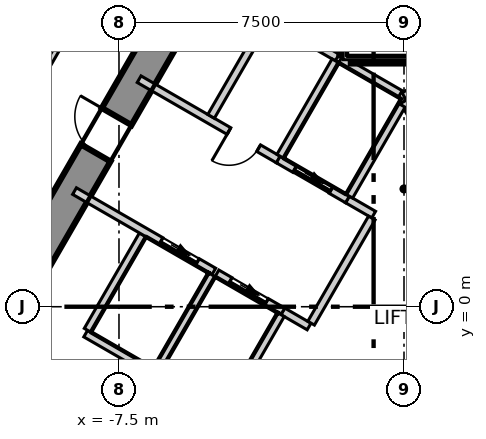
"""IFC4 building model, lengths in metres.
Left out: names, types, materials, properties, quantities, classifications, styles, units other than length and angle.
Written with IfcOpenShell. Run it as: python <this file> out.ifc"""

import sys

from ifc_helpers import new_model, si_unit, direction, frame, frame_2d, origin, place, context, subcontext, project, spatial, polyline, rectangle, outline, extrude, element, fill, save


model = new_model("IFC4")
c1 = context("Model", 3, precision=1e-05, world=origin(), true_north=direction((0.0, 1.0)))
c2 = subcontext(c1, "Body", "Model", "MODEL_VIEW")
j1 = project(units=[si_unit("LENGTHUNIT", "METRE"), si_unit("PLANEANGLEUNIT", "RADIAN")], contexts=[c1])
p1 = place(None, origin())
s1 = spatial("IfcSite", under=j1, at=p1, CompositionType="ELEMENT")
p2 = place(p1, origin())
s2 = spatial("IfcBuilding", under=s1, at=p2, CompositionType="ELEMENT")
p3 = place(p2, frame((0.0, 0.0, 47.3)))
s3 = spatial("IfcBuildingStorey", under=s2, at=p3, CompositionType="ELEMENT", Elevation=47.3)
p4 = place(p3, frame((-1.645, 15.25, -0.3), z_axis=(0.0, 0.0, 1.0), x_axis=(-0.500026485275, -0.866010111964, 0.0)))
e1 = element("IfcWall", 1, at=p4, inside=s3, PredefinedType="SHEAR", context=c2, shape_type="SweptSolid", body=[
    extrude(outline(polyline([(-0.26, -0.45), (1.685, -0.45), (3.63, -0.45), (5.576, -0.45), (7.521, -0.45), (9.466, -0.449), (11.411, -0.449), (13.357, -0.449), (15.302, -0.449), (17.247, -0.449), (19.192, -0.449), (21.138, -0.449), (23.083, -0.449), (25.028, -0.449), (24.509, 0.45), (22.644, 0.45), (20.778, 0.45), (18.913, 0.45), (17.048, 0.45), (15.182, 0.449), (13.317, 0.449), (11.452, 0.449), (9.587, 0.449), (7.721, 0.449), (5.856, 0.449), (3.991, 0.449), (2.125, 0.449), (0.26, 0.449), (-0.26, -0.45)])), origin(), (0.0, 0.0, 1.0), 4.0),
])
p5 = place(p4, frame((11.834, 0.0, 0.3)))
e2 = element("IfcOpeningElement", 2, at=p5, cuts=e1, PredefinedType="OPENING", context=c2, shape_type="SweptSolid", body=[
    extrude(rectangle(XDim=1.1, YDim=2.1, at=frame_2d((0.55, 1.05))), frame((0.0, 0.46, 0.0), z_axis=(0.0, -1.0, 0.0), x_axis=(1.0, 0.0, 0.0)), (0.0, 0.0, 1.0), 0.92),
])
p6 = place(p4, frame((6.671, 0.0, 0.3)))
e3 = element("IfcOpeningElement", 3, at=p6, cuts=e1, PredefinedType="OPENING", context=c2, shape_type="SweptSolid", body=[
    extrude(rectangle(XDim=1.0, YDim=2.1, at=frame_2d((0.5, 1.05))), frame((0.0, 0.46, 0.0), z_axis=(0.0, -1.0, 0.0), x_axis=(1.0, 0.0, 0.0)), (0.0, 0.0, 1.0), 0.92),
])
p7 = place(p3, frame((-3.417, 38.096, 0.0), z_axis=(0.0, 0.0, 1.0), x_axis=(-0.500000412988, -0.866025165346, 0.0)))
e4 = element("IfcWall", 4, at=p7, inside=s3, PredefinedType="ELEMENTEDWALL", context=c2, shape_type="SweptSolid", body=[
    extrude(rectangle(XDim=62.548, YDim=0.2, at=frame_2d((31.274, 0.0))), origin(), (0.0, 0.0, 1.0), 3.7),
])
p8 = place(p7, frame((2.25, 0.0, 0.9)))
e5 = element("IfcOpeningElement", 5, at=p8, cuts=e4, PredefinedType="OPENING", context=c2, shape_type="SweptSolid", body=[
    extrude(rectangle(XDim=5.6, YDim=2.5, at=frame_2d((2.8, 1.25))), frame((0.0, 0.11, 0.0), z_axis=(0.0, -1.0, 0.0), x_axis=(1.0, 0.0, 0.0)), (0.0, 0.0, 1.0), 0.22),
])
p9 = place(p7, frame((9.745, 0.0, 0.9)))
e6 = element("IfcOpeningElement", 6, at=p9, cuts=e4, PredefinedType="OPENING", context=c2, shape_type="SweptSolid", body=[
    extrude(rectangle(XDim=5.6, YDim=2.5, at=frame_2d((2.8, 1.25))), frame((0.0, 0.11, 0.0), z_axis=(0.0, -1.0, 0.0), x_axis=(1.0, 0.0, 0.0)), (0.0, 0.0, 1.0), 0.22),
])
p10 = place(p7, frame((17.241, 0.0, 0.9)))
e7 = element("IfcOpeningElement", 7, at=p10, cuts=e4, PredefinedType="OPENING", context=c2, shape_type="SweptSolid", body=[
    extrude(rectangle(XDim=5.6, YDim=2.5, at=frame_2d((2.8, 1.25))), frame((0.0, 0.11, 0.0), z_axis=(0.0, -1.0, 0.0), x_axis=(1.0, 0.0, 0.0)), (0.0, 0.0, 1.0), 0.22),
])
p11 = place(p7, frame((24.736, 0.0, 0.9)))
e8 = element("IfcOpeningElement", 8, at=p11, cuts=e4, PredefinedType="OPENING", context=c2, shape_type="SweptSolid", body=[
    extrude(rectangle(XDim=5.6, YDim=2.5, at=frame_2d((2.8, 1.25))), frame((0.0, 0.11, 0.0), z_axis=(0.0, -1.0, 0.0), x_axis=(1.0, 0.0, 0.0)), (0.0, 0.0, 1.0), 0.22),
])
p12 = place(p7, frame((32.231, 0.0, 0.9)))
e9 = element("IfcOpeningElement", 9, at=p12, cuts=e4, PredefinedType="OPENING", context=c2, shape_type="SweptSolid", body=[
    extrude(rectangle(XDim=5.6, YDim=2.5, at=frame_2d((2.8, 1.25))), frame((0.0, 0.11, 0.0), z_axis=(0.0, -1.0, 0.0), x_axis=(1.0, 0.0, 0.0)), (0.0, 0.0, 1.0), 0.22),
])
p13 = place(p7, frame((39.727, 0.0, 0.9)))
e10 = element("IfcOpeningElement", 10, at=p13, cuts=e4, PredefinedType="OPENING", context=c2, shape_type="SweptSolid", body=[
    extrude(rectangle(XDim=5.6, YDim=2.5, at=frame_2d((2.8, 1.25))), frame((0.0, 0.11, 0.0), z_axis=(0.0, -1.0, 0.0), x_axis=(1.0, 0.0, 0.0)), (0.0, 0.0, 1.0), 0.22),
])
p14 = place(p7, frame((47.222, 0.0, 0.9)))
e11 = element("IfcOpeningElement", 11, at=p14, cuts=e4, PredefinedType="OPENING", context=c2, shape_type="SweptSolid", body=[
    extrude(rectangle(XDim=5.6, YDim=2.5, at=frame_2d((2.8, 1.25))), frame((0.0, 0.11, 0.0), z_axis=(0.0, -1.0, 0.0), x_axis=(1.0, 0.0, 0.0)), (0.0, 0.0, 1.0), 0.22),
])
p15 = place(p7, frame((54.717, 0.0, 0.9)))
e12 = element("IfcOpeningElement", 12, at=p15, cuts=e4, PredefinedType="OPENING", context=c2, shape_type="SweptSolid", body=[
    extrude(rectangle(XDim=5.6, YDim=2.5, at=frame_2d((2.8, 1.25))), frame((0.0, 0.11, 0.0), z_axis=(0.0, -1.0, 0.0), x_axis=(1.0, 0.0, 0.0)), (0.0, 0.0, 1.0), 0.22),
])
p16 = place(p3, frame((-19.497, -11.17, 0.0), z_axis=(0.0, 0.0, 1.0), x_axis=(0.499998854553, 0.866026065108, 0.0)))
e13 = element("IfcWall", 13, at=p16, inside=s3, PredefinedType="PARTITIONING", context=c2, shape_type="SweptSolid", body=[
    extrude(rectangle(XDim=38.994, YDim=0.15, at=frame_2d((19.497, 0.0))), origin(), (0.0, 0.0, 1.0), 3.7),
])
p17 = place(p16, frame((36.144, 0.0, 0.0)))
e14 = element("IfcOpeningElement", 14, at=p17, cuts=e13, PredefinedType="OPENING", context=c2, shape_type="SweptSolid", body=[
    extrude(rectangle(XDim=1.1, YDim=2.1, at=frame_2d((0.55, 1.05))), frame((0.0, 0.085, 0.0), z_axis=(0.0, -1.0, 0.0), x_axis=(1.0, 0.0, 0.0)), (0.0, 0.0, 1.0), 0.17),
])
p18 = place(p16, frame((21.963, 0.0, 0.0)))
e15 = element("IfcOpeningElement", 15, at=p18, cuts=e13, PredefinedType="OPENING", context=c2, shape_type="SweptSolid", body=[
    extrude(rectangle(XDim=1.1, YDim=2.1, at=frame_2d((0.55, 1.05))), frame((0.0, 0.085, 0.0), z_axis=(0.0, -1.0, 0.0), x_axis=(1.0, 0.0, 0.0)), (0.0, 0.0, 1.0), 0.17),
])
p19 = place(p16, frame((32.363, 0.0, 0.0)))
e16 = element("IfcOpeningElement", 16, at=p19, cuts=e13, PredefinedType="OPENING", context=c2, shape_type="SweptSolid", body=[
    extrude(rectangle(XDim=0.9, YDim=2.1, at=frame_2d((0.45, 1.05))), frame((0.0, 0.085, 0.0), z_axis=(0.0, -1.0, 0.0), x_axis=(1.0, 0.0, 0.0)), (0.0, 0.0, 1.0), 0.17),
])
p20 = place(p16, frame((29.163, 0.0, 0.0)))
e17 = element("IfcOpeningElement", 17, at=p20, cuts=e13, PredefinedType="OPENING", context=c2, shape_type="SweptSolid", body=[
    extrude(rectangle(XDim=0.9, YDim=2.1, at=frame_2d((0.45, 1.05))), frame((0.0, 0.085, 0.0), z_axis=(0.0, -1.0, 0.0), x_axis=(1.0, 0.0, 0.0)), (0.0, 0.0, 1.0), 0.17),
])
p21 = place(p16, frame((26.263, 0.0, 0.0)))
e18 = element("IfcOpeningElement", 18, at=p21, cuts=e13, PredefinedType="OPENING", context=c2, shape_type="SweptSolid", body=[
    extrude(rectangle(XDim=1.0, YDim=2.1, at=frame_2d((0.5, 1.05))), frame((0.0, 0.085, 0.0), z_axis=(0.0, -1.0, 0.0), x_axis=(1.0, 0.0, 0.0)), (0.0, 0.0, 1.0), 0.17),
])
p22 = place(p16, frame((11.373, 0.0, 0.0)))
e19 = element("IfcOpeningElement", 19, at=p22, cuts=e13, PredefinedType="OPENING", context=c2, shape_type="SweptSolid", body=[
    extrude(rectangle(XDim=1.1, YDim=2.1, at=frame_2d((0.55, 1.05))), frame((0.0, 0.085, 0.0), z_axis=(0.0, -1.0, 0.0), x_axis=(1.0, 0.0, 0.0)), (0.0, 0.0, 1.0), 0.17),
])
p23 = place(p16, frame((1.581, 0.0, 0.0)))
e20 = element("IfcOpeningElement", 20, at=p23, cuts=e13, PredefinedType="OPENING", context=c2, shape_type="SweptSolid", body=[
    extrude(rectangle(XDim=1.1, YDim=2.1, at=frame_2d((0.55, 1.05))), frame((0.0, 0.085, 0.0), z_axis=(0.0, -1.0, 0.0), x_axis=(1.0, 0.0, 0.0)), (0.0, 0.0, 1.0), 0.17),
])
p24 = place(p3, frame((0.075, 22.47, 0.0), z_axis=(0.0, 0.0, 1.0), x_axis=(0.500002280369, -0.866024087209, 0.0)))
e21 = element("IfcWall", 21, at=p24, inside=s3, PredefinedType="PARTITIONING", context=c2, shape_type="SweptSolid", body=[
    extrude(rectangle(XDim=38.844, YDim=0.15, at=frame_2d((19.422, 0.0))), origin(), (0.0, 0.0, 1.0), 3.7),
])
p25 = place(p24, frame((36.244, 0.0, 0.0)))
e22 = element("IfcOpeningElement", 22, at=p25, cuts=e21, PredefinedType="OPENING", context=c2, shape_type="SweptSolid", body=[
    extrude(rectangle(XDim=1.0, YDim=2.1, at=frame_2d((0.5, 1.05))), frame((0.0, 0.085, 0.0), z_axis=(0.0, -1.0, 0.0), x_axis=(1.0, 0.0, 0.0)), (0.0, 0.0, 1.0), 0.17),
])
p26 = place(p24, frame((21.963, 0.0, 0.0)))
e23 = element("IfcOpeningElement", 23, at=p26, cuts=e21, PredefinedType="OPENING", context=c2, shape_type="SweptSolid", body=[
    extrude(rectangle(XDim=1.1, YDim=2.1, at=frame_2d((0.55, 1.05))), frame((0.0, 0.085, 0.0), z_axis=(0.0, -1.0, 0.0), x_axis=(1.0, 0.0, 0.0)), (0.0, 0.0, 1.0), 0.17),
])
p27 = place(p24, frame((32.363, 0.0, 0.0)))
e24 = element("IfcOpeningElement", 24, at=p27, cuts=e21, PredefinedType="OPENING", context=c2, shape_type="SweptSolid", body=[
    extrude(rectangle(XDim=0.9, YDim=2.1, at=frame_2d((0.45, 1.05))), frame((0.0, 0.085, 0.0), z_axis=(0.0, -1.0, 0.0), x_axis=(1.0, 0.0, 0.0)), (0.0, 0.0, 1.0), 0.17),
])
p28 = place(p24, frame((29.163, 0.0, 0.0)))
e25 = element("IfcOpeningElement", 25, at=p28, cuts=e21, PredefinedType="OPENING", context=c2, shape_type="SweptSolid", body=[
    extrude(rectangle(XDim=0.9, YDim=2.1, at=frame_2d((0.45, 1.05))), frame((0.0, 0.085, 0.0), z_axis=(0.0, -1.0, 0.0), x_axis=(1.0, 0.0, 0.0)), (0.0, 0.0, 1.0), 0.17),
])
p29 = place(p24, frame((26.263, 0.0, 0.0)))
e26 = element("IfcOpeningElement", 26, at=p29, cuts=e21, PredefinedType="OPENING", context=c2, shape_type="SweptSolid", body=[
    extrude(rectangle(XDim=1.0, YDim=2.1, at=frame_2d((0.5, 1.05))), frame((0.0, 0.085, 0.0), z_axis=(0.0, -1.0, 0.0), x_axis=(1.0, 0.0, 0.0)), (0.0, 0.0, 1.0), 0.17),
])
p30 = place(p24, frame((9.071, 0.0, 0.0)))
e27 = element("IfcOpeningElement", 27, at=p30, cuts=e21, PredefinedType="OPENING", context=c2, shape_type="SweptSolid", body=[
    extrude(rectangle(XDim=1.1, YDim=2.1, at=frame_2d((0.55, 1.05))), frame((0.0, 0.085, 0.0), z_axis=(0.0, -1.0, 0.0), x_axis=(1.0, 0.0, 0.0)), (0.0, 0.0, 1.0), 0.17),
])
p31 = place(p3, frame((-8.376, -0.707, 0.0), z_axis=(0.0, 0.0, 1.0), x_axis=(0.866067520717, -0.499927044236, 0.0)))
e28 = element("IfcWall", 28, at=p31, inside=s3, PredefinedType="SOLIDWALL", context=c2, shape_type="SweptSolid", body=[
    extrude(rectangle(XDim=2.1, YDim=0.2, at=frame_2d((1.05, 0.0))), origin(), (0.0, 0.0, 1.0), 3.7),
])
p32 = place(p3, frame((-8.326, -0.62, 0.0), z_axis=(0.0, 0.0, 1.0), x_axis=(0.500023687443, 0.866011727401, 0.0)))
e29 = element("IfcWall", 29, at=p32, inside=s3, PredefinedType="SOLIDWALL", context=c2, shape_type="SweptSolid", body=[
    extrude(rectangle(XDim=2.9, YDim=0.2, at=frame_2d((1.45, 0.0))), origin(), (0.0, 0.0, 1.0), 3.7),
])
p33 = place(p3, frame((-0.002, 5.541, 0.0), z_axis=(0.0, 0.0, 1.0), x_axis=(0.86600155993, 0.500041296494, 0.0)))
e30 = element("IfcWall", 30, at=p33, inside=s3, PredefinedType="SOLIDWALL", context=c2, shape_type="SweptSolid", body=[
    extrude(rectangle(XDim=4.132, YDim=0.2, at=frame_2d((2.066, 0.0))), origin(), (0.0, 0.0, 1.0), 3.7),
])
p34 = place(p3, frame((0.0, 5.4, 0.0), z_axis=(0.0, 0.0, 1.0), x_axis=(0.500103862429, -0.865965430478, 0.0)))
e31 = element("IfcWall", 31, at=p34, inside=s3, PredefinedType="SOLIDWALL", context=c2, shape_type="SweptSolid", body=[
    extrude(rectangle(XDim=2.973, YDim=0.2, at=frame_2d((1.487, 0.0))), origin(), (0.0, 0.0, 1.0), 3.7),
])
p35 = place(p34, frame((0.937, 0.0, 0.0)))
e32 = element("IfcOpeningElement", 32, at=p35, cuts=e31, PredefinedType="OPENING", context=c2, shape_type="SweptSolid", body=[
    extrude(rectangle(XDim=1.1, YDim=2.1, at=frame_2d((0.55, 1.05))), frame((0.0, 0.11, 0.0), z_axis=(0.0, -1.0, 0.0), x_axis=(1.0, 0.0, 0.0)), (0.0, 0.0, 1.0), 0.22),
])
p36 = place(p3, frame((-8.67, 3.043, 0.0), z_axis=(0.0, 0.0, 1.0), x_axis=(0.866029956157, -0.499992114976, 0.0)))
e33 = element("IfcWall", 33, at=p36, inside=s3, PredefinedType="SOLIDWALL", context=c2, shape_type="SweptSolid", body=[
    extrude(rectangle(XDim=4.232, YDim=0.2, at=frame_2d((2.116, 0.0))), origin(), (0.0, 0.0, 1.0), 3.7),
])
p37 = place(p36, frame((2.63, 0.0, 0.0)))
e34 = element("IfcOpeningElement", 34, at=p37, cuts=e33, PredefinedType="OPENING", context=c2, shape_type="SweptSolid", body=[
    extrude(rectangle(XDim=1.1, YDim=2.1, at=frame_2d((0.55, 1.05))), frame((0.0, 0.11, 0.0), z_axis=(0.0, -1.0, 0.0), x_axis=(1.0, 0.0, 0.0)), (0.0, 0.0, 1.0), 0.22),
])
p38 = place(p3, frame((-3.188, -0.122, 0.0), z_axis=(0.0, 0.0, 1.0), x_axis=(0.865705793592, -0.50055317294, 0.0)))
e35 = element("IfcWall", 35, at=p38, inside=s3, PredefinedType="SOLIDWALL", context=c2, shape_type="SweptSolid", body=[
    extrude(rectangle(XDim=0.797, YDim=0.2, at=frame_2d((0.398, 0.0))), origin(), (0.0, 0.0, 1.0), 3.7),
])
p39 = place(p3, frame((-6.97, 5.987, 0.0), z_axis=(0.0, 0.0, 1.0), x_axis=(0.866029956157, -0.499992114976, 0.0)))
e36 = element("IfcWall", 36, at=p39, inside=s3, PredefinedType="SOLIDWALL", context=c2, shape_type="SweptSolid", body=[
    extrude(rectangle(XDim=4.232, YDim=0.2, at=frame_2d((2.116, 0.0))), origin(), (0.0, 0.0, 1.0), 3.7),
])
p40 = place(p39, frame((2.73, 0.0, 0.0)))
e37 = element("IfcOpeningElement", 37, at=p40, cuts=e36, PredefinedType="OPENING", context=c2, shape_type="SweptSolid", body=[
    extrude(rectangle(XDim=0.9, YDim=2.1, at=frame_2d((0.45, 1.05))), frame((0.0, 0.11, 0.0), z_axis=(0.0, -1.0, 0.0), x_axis=(1.0, 0.0, 0.0)), (0.0, 0.0, 1.0), 0.22),
])
p41 = place(p3, frame((-1.488, 2.822, 0.0), z_axis=(0.0, 0.0, 1.0), x_axis=(0.866236612152, -0.499633997809, 0.0)))
e38 = element("IfcWall", 38, at=p41, inside=s3, PredefinedType="SOLIDWALL", context=c2, shape_type="SweptSolid", body=[
    extrude(rectangle(XDim=0.796, YDim=0.2, at=frame_2d((0.398, 0.0))), origin(), (0.0, 0.0, 1.0), 3.7),
])
p42 = place(p3, frame((-5.076, 5.009, 0.0), z_axis=(0.0, 0.0, 1.0), x_axis=(0.50002537861, 0.866010750942, 0.0)))
e39 = element("IfcWall", 39, at=p42, inside=s3, PredefinedType="SOLIDWALL", context=c2, shape_type="SweptSolid", body=[
    extrude(rectangle(XDim=3.0, YDim=0.2, at=frame_2d((1.5, 0.0))), origin(), (0.0, 0.0, 1.0), 3.7),
])
p43 = place(p3, frame((-3.489, 7.557, 0.0), z_axis=(0.0, 0.0, 1.0), x_axis=(0.866010750942, -0.50002537861, 0.0)))
e40 = element("IfcWall", 40, at=p43, inside=s3, PredefinedType="SOLIDWALL", context=c2, shape_type="SweptSolid", body=[
    extrude(rectangle(XDim=2.0, YDim=0.2, at=frame_2d((1.0, 0.0))), origin(), (0.0, 0.0, 1.0), 3.7),
])
p44 = place(p3, frame((-2.444, -0.433, 0.0), z_axis=(0.0, 0.0, 1.0), x_axis=(0.500035624827, 0.866004834804, 0.0)))
e41 = element("IfcWall", 41, at=p44, inside=s3, PredefinedType="SOLIDWALL", context=c2, shape_type="SweptSolid", body=[
    extrude(rectangle(XDim=3.194, YDim=0.2, at=frame_2d((1.597, 0.0))), origin(), (0.0, 0.0, 1.0), 3.7),
])
p45 = place(p3, frame((-6.507, -1.67, 0.0), z_axis=(0.0, 0.0, 1.0), x_axis=(0.50012328804, 0.865954211699, 0.0)))
e42 = element("IfcWall", 42, at=p45, inside=s3, PredefinedType="SOLIDWALL", context=c2, shape_type="SweptSolid", body=[
    extrude(rectangle(XDim=2.9, YDim=0.2, at=frame_2d((1.45, 0.0))), origin(), (0.0, 0.0, 1.0), 3.7),
])
p46 = place(p3, frame((-4.922, 0.879, 0.0), z_axis=(0.0, 0.0, 1.0), x_axis=(0.866073918653, -0.499915960366, 0.0)))
e43 = element("IfcWall", 43, at=p46, inside=s3, PredefinedType="SOLIDWALL", context=c2, shape_type="SweptSolid", body=[
    extrude(rectangle(XDim=2.002, YDim=0.2, at=frame_2d((1.001, 0.0))), origin(), (0.0, 0.0, 1.0), 3.7),
])
p47 = place(p46, frame((0.402, 0.0, 0.0)))
e44 = element("IfcOpeningElement", 44, at=p47, cuts=e43, PredefinedType="OPENING", context=c2, shape_type="SweptSolid", body=[
    extrude(rectangle(XDim=1.1, YDim=2.1, at=frame_2d((0.55, 1.05))), frame((0.0, 0.11, 0.0), z_axis=(0.0, -1.0, 0.0), x_axis=(1.0, 0.0, 0.0)), (0.0, 0.0, 1.0), 0.22),
])
p48 = place(p3, frame((-4.619, -2.6, 0.0), z_axis=(0.0, 0.0, 1.0), x_axis=(0.50009492287, 0.865970593103, 0.0)))
e45 = element("IfcWall", 45, at=p48, inside=s3, PredefinedType="SOLIDWALL", context=c2, shape_type="SweptSolid", body=[
    extrude(rectangle(XDim=2.761, YDim=0.2, at=frame_2d((1.381, 0.0))), origin(), (0.0, 0.0, 1.0), 3.7),
])
p49 = place(p3, frame((-3.309, 3.873, 0.0), z_axis=(0.0, 0.0, 1.0), x_axis=(0.866098583652, -0.499873227325, 0.0)))
e46 = element("IfcWall", 46, at=p49, inside=s3, PredefinedType="SOLIDWALL", context=c2, shape_type="SweptSolid", body=[
    extrude(rectangle(XDim=2.103, YDim=0.2, at=frame_2d((1.051, 0.0))), origin(), (0.0, 0.0, 1.0), 3.7),
])
p50 = place(p49, frame((0.502, 0.0, 0.0)))
e47 = element("IfcOpeningElement", 47, at=p50, cuts=e46, PredefinedType="OPENING", context=c2, shape_type="SweptSolid", body=[
    extrude(rectangle(XDim=1.1, YDim=2.1, at=frame_2d((0.55, 1.05))), frame((0.0, 0.11, 0.0), z_axis=(0.0, -1.0, 0.0), x_axis=(1.0, 0.0, 0.0)), (0.0, 0.0, 1.0), 0.22),
])
p51 = place(p3, frame((-3.257, 3.959, 0.0), z_axis=(0.0, 0.0, 1.0), x_axis=(0.50012328804, 0.865954211699, 0.0)))
e48 = element("IfcWall", 48, at=p51, inside=s3, PredefinedType="SOLIDWALL", context=c2, shape_type="SweptSolid", body=[
    extrude(rectangle(XDim=2.9, YDim=0.2, at=frame_2d((1.45, 0.0))), origin(), (0.0, 0.0, 1.0), 3.7),
])
p52 = place(p3, frame((-1.67, 6.507, 0.0), z_axis=(0.0, 0.0, 1.0), x_axis=(0.865941441609, -0.500145398563, 0.0)))
e49 = element("IfcWall", 49, at=p52, inside=s3, PredefinedType="SOLIDWALL", context=c2, shape_type="SweptSolid", body=[
    extrude(rectangle(XDim=1.815, YDim=0.2, at=frame_2d((0.908, 0.0))), origin(), (0.0, 0.0, 1.0), 3.7),
])
p53 = place(p3, frame((-1.438, 2.909, 0.0), z_axis=(0.0, 0.0, 1.0), x_axis=(0.499829630636, 0.866123744241, 0.0)))
e50 = element("IfcWall", 50, at=p53, inside=s3, PredefinedType="SOLIDWALL", context=c2, shape_type="SweptSolid", body=[
    extrude(rectangle(XDim=2.761, YDim=0.2, at=frame_2d((1.38, 0.0))), origin(), (0.0, 0.0, 1.0), 3.7),
])
p54 = place(p3, frame((-1.4, 6.5, 0.0), z_axis=(0.0, 0.0, 1.0), x_axis=(1.0, 0.0, 0.0)))
e51 = element("IfcWall", 51, at=p54, inside=s3, PredefinedType="SOLIDWALL", context=c2, shape_type="SweptSolid", body=[
    extrude(rectangle(XDim=2.8, YDim=0.2, at=frame_2d((1.4, 0.0))), origin(), (0.0, 0.0, 1.0), 3.7),
])
p55 = place(p3, frame((-1.6, 6.615, 0.0), z_axis=(0.0, 0.0, 1.0), x_axis=(0.0, 1.0, 0.0)))
e52 = element("IfcWall", 52, at=p55, inside=s3, PredefinedType="SOLIDWALL", context=c2, shape_type="SweptSolid", body=[
    extrude(rectangle(XDim=8.615, YDim=0.2, at=frame_2d((4.308, 0.0))), origin(), (0.0, 0.0, 1.0), 3.7),
])
p56 = place(p47, origin())
e53 = element("IfcDoor", 53, at=p56, inside=s3, OperationType="SLIDING_TO_LEFT", PredefinedType="DOOR", context=c2, shape_type="SweptSolid", body=[
    extrude(rectangle(XDim=1.1, YDim=2.1, at=frame_2d((0.55, 1.05))), frame((0.0, 0.025, 0.0), z_axis=(0.0, -1.0, 0.0), x_axis=(1.0, 0.0, 0.0)), (0.0, 0.0, 1.0), 0.05),
])
fill(e44, e53)
p57 = place(p50, origin())
e54 = element("IfcDoor", 54, at=p57, inside=s3, OperationType="SLIDING_TO_LEFT", PredefinedType="DOOR", context=c2, shape_type="SweptSolid", body=[
    extrude(rectangle(XDim=1.1, YDim=2.1, at=frame_2d((0.55, 1.05))), frame((0.0, 0.025, 0.0), z_axis=(0.0, -1.0, 0.0), x_axis=(1.0, 0.0, 0.0)), (0.0, 0.0, 1.0), 0.05),
])
fill(e47, e54)
p58 = place(p37, origin())
e55 = element("IfcDoor", 55, at=p58, inside=s3, OperationType="SLIDING_TO_LEFT", PredefinedType="DOOR", context=c2, shape_type="SweptSolid", body=[
    extrude(rectangle(XDim=1.1, YDim=2.1, at=frame_2d((0.55, 1.05))), frame((0.0, 0.025, 0.0), z_axis=(0.0, -1.0, 0.0), x_axis=(1.0, 0.0, 0.0)), (0.0, 0.0, 1.0), 0.05),
])
fill(e34, e55)
p59 = place(p40, origin())
e56 = element("IfcDoor", 56, at=p59, inside=s3, OperationType="SINGLE_SWING_LEFT", PredefinedType="DOOR", context=c2, shape_type="SweptSolid", body=[
    extrude(rectangle(XDim=0.9, YDim=2.1, at=frame_2d((0.45, 1.05))), frame((0.0, 0.025, 0.0), z_axis=(0.0, -1.0, 0.0), x_axis=(1.0, 0.0, 0.0)), (0.0, 0.0, 1.0), 0.05),
])
fill(e37, e56)
p60 = place(p5, origin())
e57 = element("IfcDoor", 57, at=p60, inside=s3, OperationType="SINGLE_SWING_LEFT", PredefinedType="DOOR", context=c2, shape_type="SweptSolid", body=[
    extrude(rectangle(XDim=1.1, YDim=2.1, at=frame_2d((0.55, 1.05))), frame((0.0, 0.025, 0.0), z_axis=(0.0, -1.0, 0.0), x_axis=(1.0, 0.0, 0.0)), (0.0, 0.0, 1.0), 0.05),
])
fill(e2, e57)
save(model, sys.argv[1])
